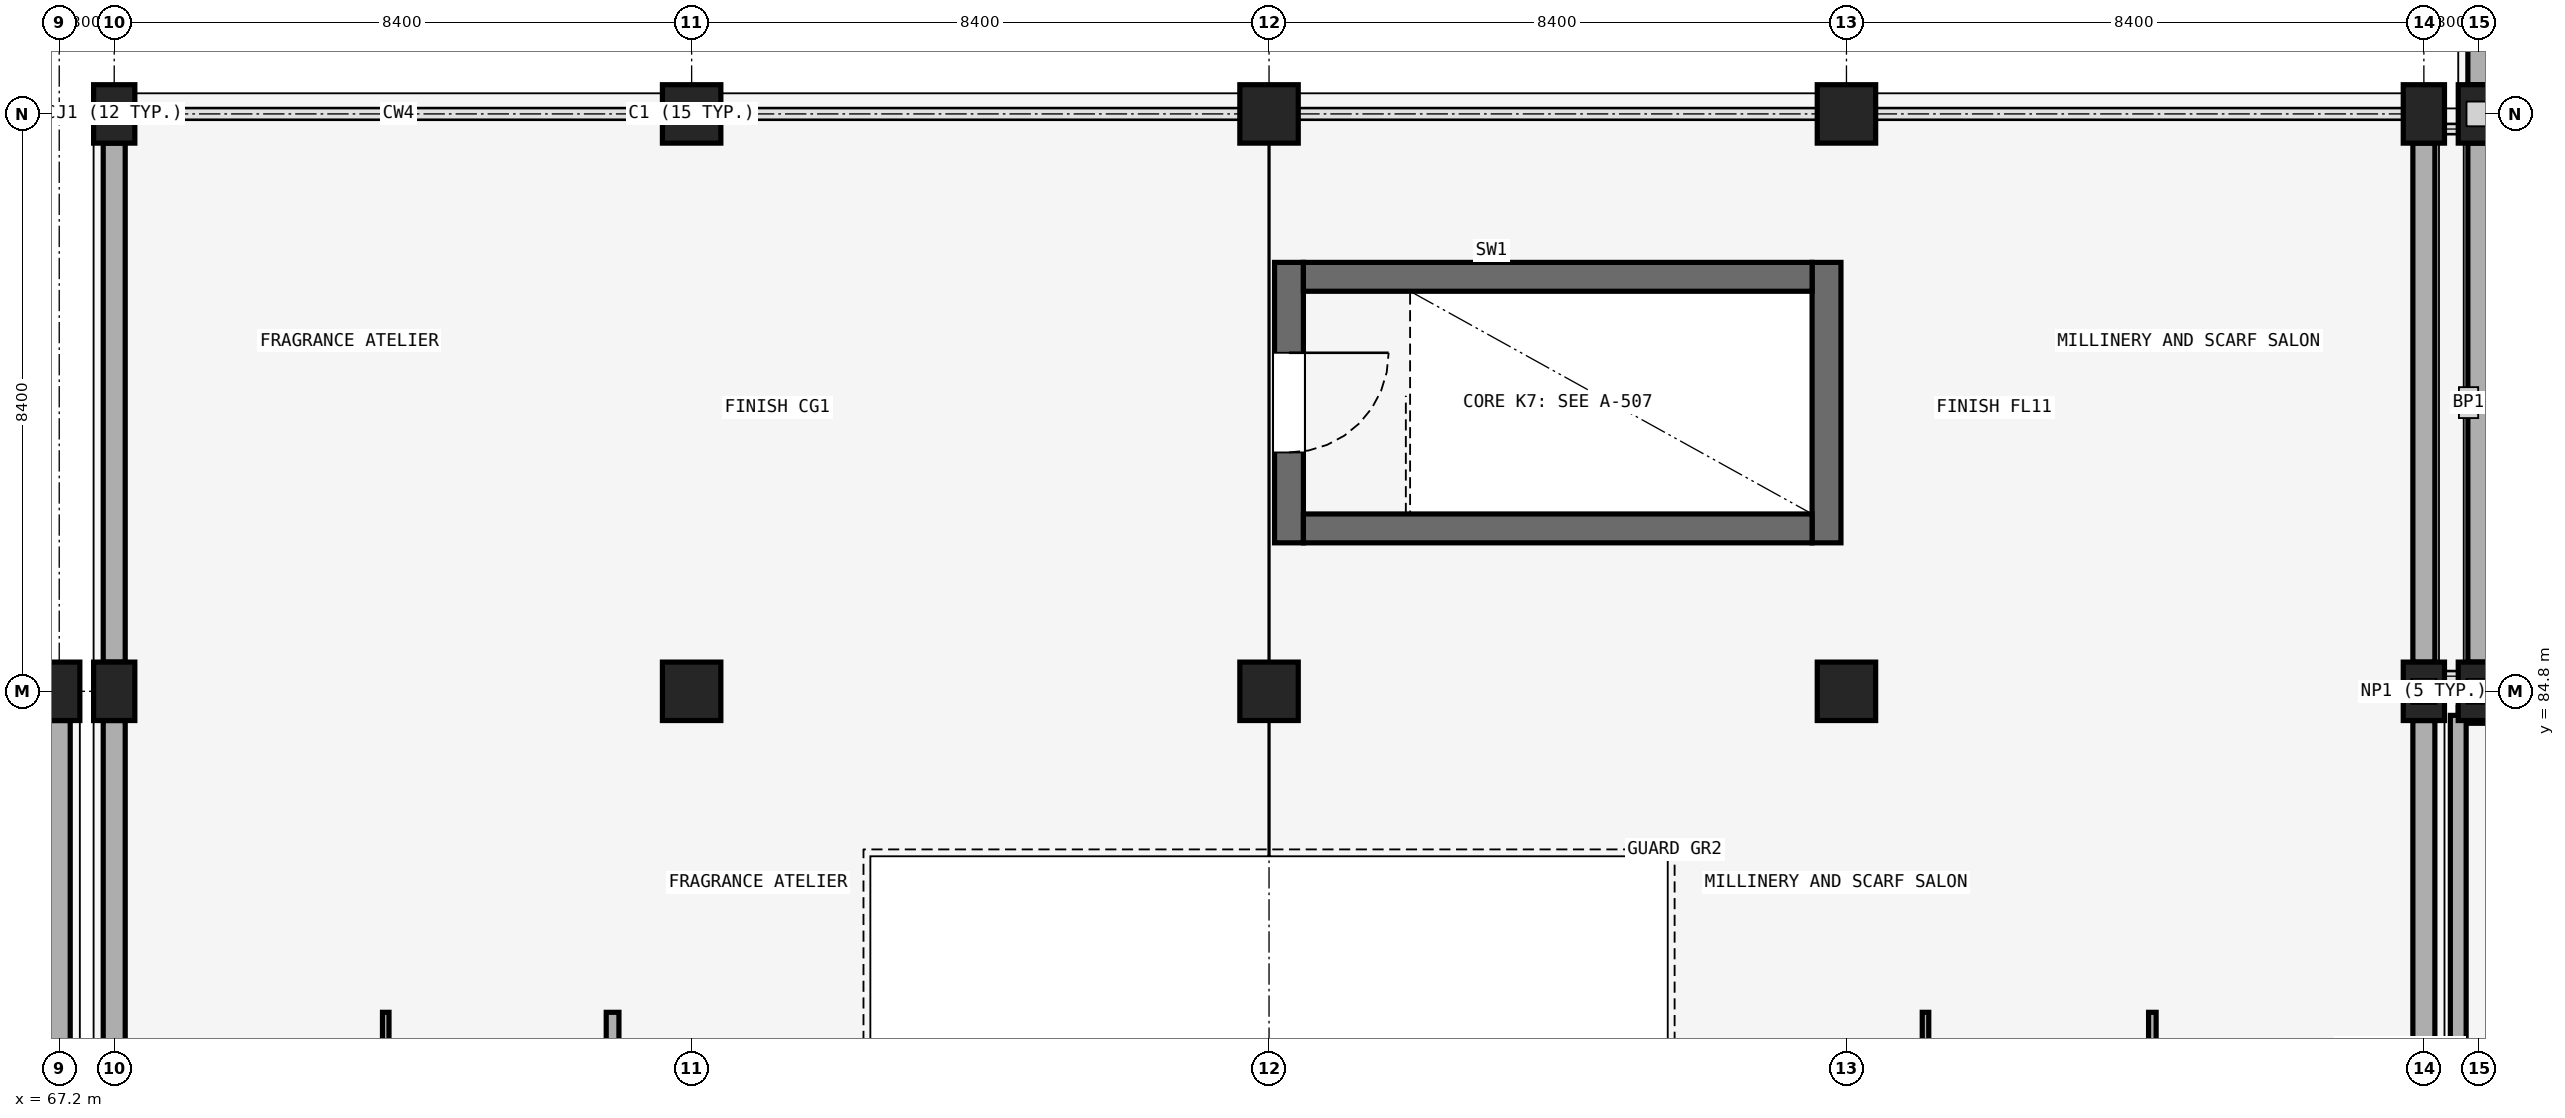
"""IFC4 building model, lengths in metres.
Left out: names, types, materials, properties, quantities, classifications, styles, units other than length and angle.
Written with IfcOpenShell. Run it as: python <this file> out.ifc"""

import sys

from ifc_helpers import new_model, si_unit, direction, frame, frame_2d, origin, origin_2d, place, context, subcontext, project, spatial, rectangle, extrude, element, fill, save


model = new_model("IFC4")
c1 = context("Model", 3, precision=1e-05, world=origin(), true_north=direction((0.0, 1.0)))
c2 = subcontext(c1, "Body", "Model", "MODEL_VIEW")
j1 = project(units=[si_unit("LENGTHUNIT", "METRE"), si_unit("PLANEANGLEUNIT", "RADIAN")], contexts=[c1])
p1 = place(None, origin())
s1 = spatial("IfcSite", under=j1, at=p1, CompositionType="ELEMENT")
p2 = place(p1, origin())
s2 = spatial("IfcBuilding", under=s1, at=p2, CompositionType="ELEMENT")
p3 = place(p2, frame((0.0, 0.0, 9.9)))
s3 = spatial("IfcBuildingStorey", under=s2, at=p3, CompositionType="ELEMENT", Elevation=9.9)
for number, where, z_axis, x_axis in (
    (1, (67.2, 84.8, 0.0), (0.0, 0.0, 1.0), (1.0, 0.0, 0.0)),
    (2, (68.0, 84.8, 0.0), (0.0, 0.0, 1.0), (1.0, 0.0, 0.0)),
):
    element("IfcColumn", number, at=place(p3, frame(where, z_axis=z_axis, x_axis=x_axis)), inside=s3, PredefinedType="COLUMN", context=c2, shape_type="SweptSolid", body=[
        extrude(rectangle(XDim=0.6, YDim=0.85, at=origin_2d()), origin(), (0.0, 0.0, 1.0), 4.5),
    ])
for number, where, z_axis, x_axis in (
    (3, (76.4, 84.8, 0.0), (0.0, 0.0, 1.0), (1.0, 0.0, 0.0)),
    (4, (84.8, 84.8, 0.0), (0.0, 0.0, 1.0), (1.0, 0.0, 0.0)),
    (5, (93.2, 84.8, 0.0), (0.0, 0.0, 1.0), (1.0, 0.0, 0.0)),
):
    element("IfcColumn", number, at=place(p3, frame(where, z_axis=z_axis, x_axis=x_axis)), inside=s3, PredefinedType="COLUMN", context=c2, shape_type="SweptSolid", body=[
        extrude(rectangle(XDim=0.85, YDim=0.85, at=origin_2d()), origin(), (0.0, 0.0, 1.0), 4.5),
    ])
for number, where, z_axis, x_axis in (
    (6, (101.6, 84.8, 0.0), (0.0, 0.0, 1.0), (1.0, 0.0, 0.0)),
    (7, (68.0, 93.2, 0.0), (0.0, 0.0, 1.0), (1.0, 0.0, 0.0)),
):
    element("IfcColumn", number, at=place(p3, frame(where, z_axis=z_axis, x_axis=x_axis)), inside=s3, PredefinedType="COLUMN", context=c2, shape_type="SweptSolid", body=[
        extrude(rectangle(XDim=0.6, YDim=0.85, at=origin_2d()), origin(), (0.0, 0.0, 1.0), 4.5),
    ])
for number, where, z_axis, x_axis in (
    (8, (76.4, 93.2, 0.0), (0.0, 0.0, 1.0), (1.0, 0.0, 0.0)),
    (9, (84.8, 93.2, 0.0), (0.0, 0.0, 1.0), (1.0, 0.0, 0.0)),
    (10, (93.2, 93.2, 0.0), (0.0, 0.0, 1.0), (1.0, 0.0, 0.0)),
):
    element("IfcColumn", number, at=place(p3, frame(where, z_axis=z_axis, x_axis=x_axis)), inside=s3, PredefinedType="COLUMN", context=c2, shape_type="SweptSolid", body=[
        extrude(rectangle(XDim=0.85, YDim=0.85, at=origin_2d()), origin(), (0.0, 0.0, 1.0), 4.5),
    ])
for number, where, z_axis, x_axis in (
    (11, (101.6, 93.2, 0.0), (0.0, 0.0, 1.0), (1.0, 0.0, 0.0)),
    (12, (102.4, 84.8, 0.0), (0.0, 0.0, 1.0), (1.0, 0.0, 0.0)),
    (13, (102.4, 93.2, 0.0), (0.0, 0.0, 1.0), (1.0, 0.0, 0.0)),
):
    element("IfcColumn", number, at=place(p3, frame(where, z_axis=z_axis, x_axis=x_axis)), inside=s3, PredefinedType="COLUMN", context=c2, shape_type="SweptSolid", body=[
        extrude(rectangle(XDim=0.6, YDim=0.85, at=origin_2d()), origin(), (0.0, 0.0, 1.0), 4.5),
    ])
p4 = place(p3, frame((67.2, 76.825, 0.0), z_axis=(0.0, 0.0, 1.0), x_axis=(0.0, 1.0, 0.0)))
e14 = element("IfcWall", 14, at=p4, inside=s3, PredefinedType="SOLIDWALL", context=c2, shape_type="SweptSolid", body=[
    extrude(rectangle(XDim=7.55, YDim=0.32, at=frame_2d((3.775, 0.0))), origin(), (0.0, 0.0, 1.0), 3.45),
])
p5 = place(p3, frame((68.0, 76.825, 0.0), z_axis=(0.0, 0.0, 1.0), x_axis=(0.0, 1.0, 0.0)))
e15 = element("IfcWall", 15, at=p5, inside=s3, PredefinedType="SOLIDWALL", context=c2, shape_type="SweptSolid", body=[
    extrude(rectangle(XDim=7.55, YDim=0.32, at=frame_2d((3.775, 0.0))), origin(), (0.0, 0.0, 1.0), 3.49),
])
p6 = place(p3, frame((68.0, 85.225, 0.0), z_axis=(0.0, 0.0, 1.0), x_axis=(0.0, 1.0, 0.0)))
e16 = element("IfcWall", 16, at=p6, inside=s3, PredefinedType="SOLIDWALL", context=c2, shape_type="SweptSolid", body=[
    extrude(rectangle(XDim=7.55, YDim=0.32, at=frame_2d((3.775, 0.0))), origin(), (0.0, 0.0, 1.0), 3.49),
])
p7 = place(p3, frame((101.6, 76.825, 0.0), z_axis=(0.0, 0.0, 1.0), x_axis=(0.0, 1.0, 0.0)))
e17 = element("IfcWall", 17, at=p7, inside=s3, PredefinedType="SOLIDWALL", context=c2, shape_type="SweptSolid", body=[
    extrude(rectangle(XDim=7.55, YDim=0.32, at=frame_2d((3.775, 0.0))), origin(), (0.0, 0.0, 1.0), 3.49),
])
p8 = place(p3, frame((101.6, 85.225, 0.0), z_axis=(0.0, 0.0, 1.0), x_axis=(0.0, 1.0, 0.0)))
e18 = element("IfcWall", 18, at=p8, inside=s3, PredefinedType="SOLIDWALL", context=c2, shape_type="SweptSolid", body=[
    extrude(rectangle(XDim=7.55, YDim=0.32, at=frame_2d((3.775, 0.0))), origin(), (0.0, 0.0, 1.0), 3.49),
])
p9 = place(p3, frame((102.4, 85.225, 0.0), z_axis=(0.0, 0.0, 1.0), x_axis=(0.0, 1.0, 0.0)))
e19 = element("IfcWall", 19, at=p9, inside=s3, PredefinedType="SOLIDWALL", context=c2, shape_type="SweptSolid", body=[
    extrude(rectangle(XDim=7.55, YDim=0.32, at=frame_2d((3.775, 0.0))), origin(), (0.0, 0.0, 1.0), 3.45),
])
p10 = place(p3, frame((102.4, 93.625, 0.0), z_axis=(0.0, 0.0, 1.0), x_axis=(0.0, 1.0, 0.0)))
e20 = element("IfcWall", 20, at=p10, inside=s3, PredefinedType="SOLIDWALL", context=c2, shape_type="SweptSolid", body=[
    extrude(rectangle(XDim=7.55, YDim=0.32, at=frame_2d((3.775, 0.0))), origin(), (0.0, 0.0, 1.0), 3.45),
])
p11 = place(p3, frame((144.05, 84.45, 0.0), z_axis=(0.0, 0.0, 1.0), x_axis=(-1.0, 0.0, 0.0)))
e21 = element("IfcWall", 21, at=p11, inside=s3, PredefinedType="PARAPET", context=c2, shape_type="SweptSolid", body=[
    extrude(rectangle(XDim=41.95, YDim=0.23, at=frame_2d((20.975, 0.0))), origin(), (0.0, 0.0, 1.0), 0.95),
])
p12 = place(p3, frame((102.1, 84.45, 0.0), z_axis=(0.0, 0.0, 1.0), x_axis=(0.0, -1.0, 0.0)))
e22 = element("IfcWall", 22, at=p12, inside=s3, PredefinedType="PARAPET", context=c2, shape_type="SweptSolid", body=[
    extrude(rectangle(XDim=8.35, YDim=0.23, at=frame_2d((4.175, 0.0))), origin(), (0.0, 0.0, 1.0), 0.95),
])
p13 = place(p3, frame((85.09, 91.04, 0.0), z_axis=(0.0, 0.0, 1.0), x_axis=(0.0, -1.0, 0.0)))
e23 = element("IfcWall", 23, at=p13, inside=s3, PredefinedType="SHEAR", context=c2, shape_type="SweptSolid", body=[
    extrude(rectangle(XDim=4.08, YDim=0.42, at=frame_2d((2.04, 0.0))), origin(), (0.0, 0.0, 1.0), 4.24),
])
p14 = place(p13, frame((1.315, 0.0, 0.0)))
e24 = element("IfcOpeningElement", 24, at=p14, cuts=e23, PredefinedType="OPENING", context=c2, shape_type="SweptSolid", body=[
    extrude(rectangle(XDim=1.45, YDim=2.2, at=frame_2d((0.725, 1.1))), frame((0.0, 0.22, 0.0), z_axis=(0.0, -1.0, 0.0), x_axis=(1.0, 0.0, 0.0)), (0.0, 0.0, 1.0), 0.44),
])
p15 = place(p3, frame((92.91, 86.96, 0.0), z_axis=(0.0, 0.0, 1.0), x_axis=(0.0, 1.0, 0.0)))
e25 = element("IfcWall", 25, at=p15, inside=s3, PredefinedType="SHEAR", context=c2, shape_type="SweptSolid", body=[
    extrude(rectangle(XDim=4.08, YDim=0.42, at=frame_2d((2.04, 0.0))), origin(), (0.0, 0.0, 1.0), 4.24),
])
for number, where, z_axis, x_axis in (
    (26, (85.3, 87.17, 0.0), (0.0, 0.0, 1.0), (1.0, 0.0, 0.0)),
    (27, (85.3, 90.83, 0.0), (0.0, 0.0, 1.0), (1.0, 0.0, 0.0)),
):
    element("IfcWall", number, at=place(p3, frame(where, z_axis=z_axis, x_axis=x_axis)), inside=s3, PredefinedType="SHEAR", context=c2, shape_type="SweptSolid", body=[
        extrude(rectangle(XDim=7.4, YDim=0.42, at=frame_2d((3.7, 0.0))), origin(), (0.0, 0.0, 1.0), 4.24),
    ])
p16 = place(p3, frame((71.95, 72.52, 0.0), z_axis=(0.0, 0.0, 1.0), x_axis=(0.0, 1.0, 0.0)))
e28 = element("IfcWall", 28, at=p16, inside=s3, PredefinedType="PARTITIONING", context=c2, shape_type="SweptSolid", body=[
    extrude(rectangle(XDim=7.61, YDim=0.095, at=frame_2d((3.805, 0.0))), origin(), (0.0, 0.0, 1.0), 3.49),
])
p17 = place(p3, frame((75.25, 72.52, 0.0), z_axis=(0.0, 0.0, 1.0), x_axis=(0.0, 1.0, 0.0)))
e29 = element("IfcWall", 29, at=p17, inside=s3, PredefinedType="PARTITIONING", context=c2, shape_type="SweptSolid", body=[
    extrude(rectangle(XDim=7.61, YDim=0.185, at=frame_2d((3.805, 0.0))), origin(), (0.0, 0.0, 1.0), 3.49),
])
p18 = place(p3, frame((97.65, 72.52, 0.0), z_axis=(0.0, 0.0, 1.0), x_axis=(0.0, 1.0, 0.0)))
e30 = element("IfcWall", 30, at=p18, inside=s3, PredefinedType="PARTITIONING", context=c2, shape_type="SweptSolid", body=[
    extrude(rectangle(XDim=7.61, YDim=0.11, at=frame_2d((3.805, 0.0))), origin(), (0.0, 0.0, 1.0), 3.49),
])
p19 = place(p3, frame((94.35, 72.52, 0.0), z_axis=(0.0, 0.0, 1.0), x_axis=(0.0, 1.0, 0.0)))
e31 = element("IfcWall", 31, at=p19, inside=s3, PredefinedType="PARTITIONING", context=c2, shape_type="SweptSolid", body=[
    extrude(rectangle(XDim=7.61, YDim=0.095, at=frame_2d((3.805, 0.0))), origin(), (0.0, 0.0, 1.0), 3.49),
])
p20 = place(p14, origin())
e32 = element("IfcDoor", 32, at=p20, inside=s3, OperationType="SINGLE_SWING_LEFT", PredefinedType="DOOR", context=c2, shape_type="SweptSolid", body=[
    extrude(rectangle(XDim=1.45, YDim=2.2, at=frame_2d((0.725, 1.1))), frame((0.0, 0.025, 0.0), z_axis=(0.0, -1.0, 0.0), x_axis=(1.0, 0.0, 0.0)), (0.0, 0.0, 1.0), 0.05),
])
fill(e24, e32)
save(model, sys.argv[1])
